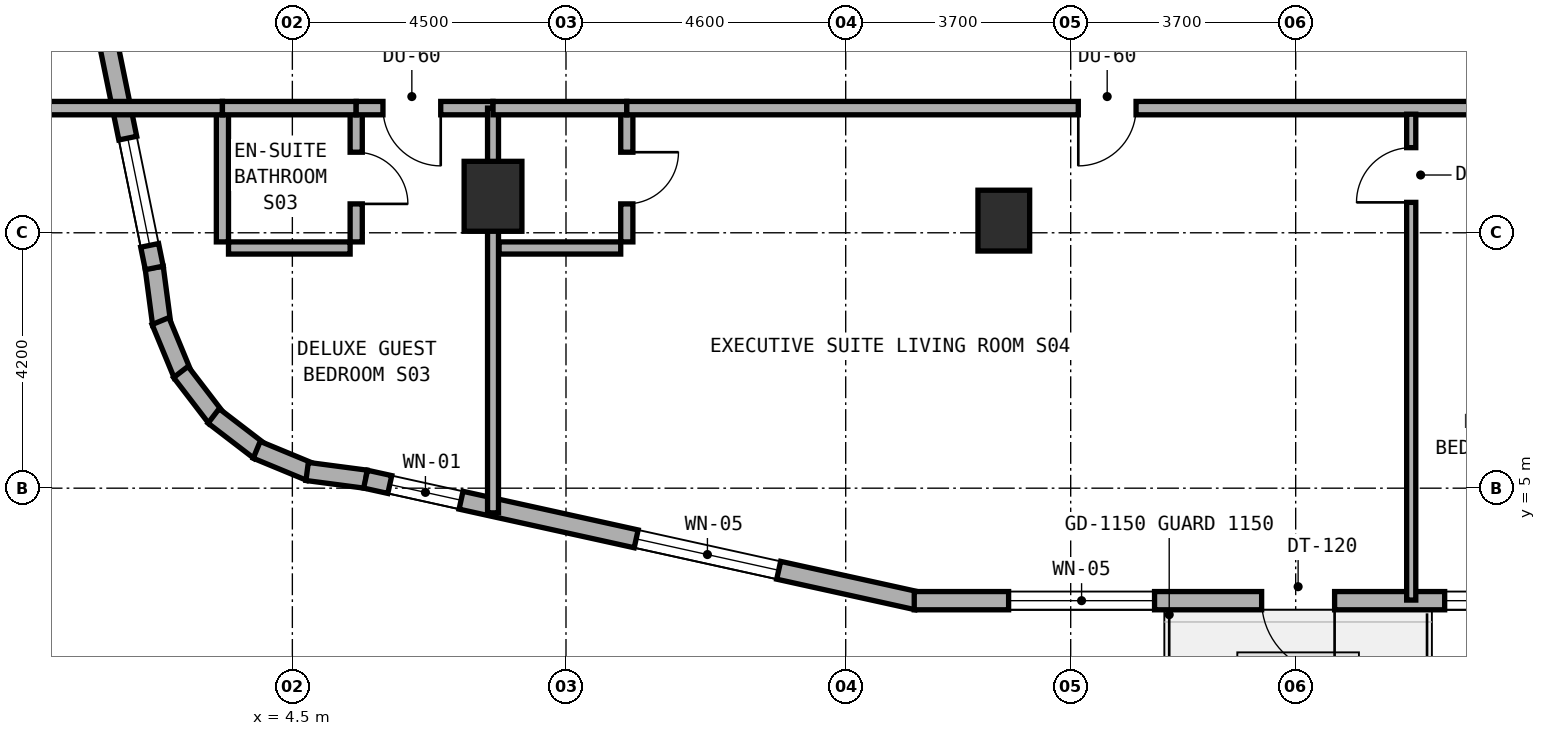
"""IFC4 building model, lengths in metres.
Left out: names, types, materials, properties, quantities, classifications, styles, units other than length and angle.
Written with IfcOpenShell. Run it as: python <this file> out.ifc"""

import sys

from ifc_helpers import new_model, si_unit, direction, frame, frame_2d, origin, origin_2d, place, context, subcontext, project, spatial, rectangle, extrude, element, fill, save


model = new_model("IFC4")
c1 = context("Model", 3, precision=1e-05, world=origin(), true_north=direction((0.0, 1.0)))
c2 = subcontext(c1, "Body", "Model", "MODEL_VIEW")
j1 = project(units=[si_unit("LENGTHUNIT", "METRE"), si_unit("PLANEANGLEUNIT", "RADIAN")], contexts=[c1])
p1 = place(None, origin())
s1 = spatial("IfcSite", under=j1, at=p1, CompositionType="ELEMENT")
p2 = place(p1, origin())
s2 = spatial("IfcBuilding", under=s1, at=p2, CompositionType="ELEMENT")
p3 = place(p2, frame((0.0, 0.0, 80.0)))
s3 = spatial("IfcBuildingStorey", under=s2, at=p3, CompositionType="ELEMENT", Elevation=80.0)
p4 = place(p3, frame((16.2, 9.4, 0.0), z_axis=(0.0, 0.0, 1.0), x_axis=(1.0, 0.0, 0.0)))
e1 = element("IfcColumn", 1, at=p4, inside=s3, PredefinedType="COLUMN", context=c2, shape_type="SweptSolid", body=[
    extrude(rectangle(XDim=0.85, YDim=1.0, at=origin_2d()), origin(), (0.0, 0.0, 1.0), 3.5),
])
p5 = place(p3, frame((7.8, 9.8, 0.0), z_axis=(0.0, 0.0, 1.0), x_axis=(1.0, 0.0, 0.0)))
e2 = element("IfcColumn", 2, at=p5, inside=s3, PredefinedType="COLUMN", context=c2, shape_type="SweptSolid", body=[
    extrude(rectangle(XDim=0.95, YDim=1.15, at=origin_2d()), origin(), (0.0, 0.0, 1.0), 3.5),
])
p6 = place(p3, frame((2.228, 8.628, 0.0), z_axis=(0.0, 0.0, 1.0), x_axis=(0.131174864804, -0.991359246108, 0.0)))
e3 = element("IfcWall", 3, at=p6, inside=s3, PredefinedType="STANDARD", context=c2, shape_type="SweptSolid", body=[
    extrude(rectangle(XDim=0.938, YDim=0.3, at=frame_2d((0.469, 0.0))), origin(), (0.0, 0.0, 1.0), 3.22),
])
p7 = place(p3, frame((2.332, 7.748, 0.0), z_axis=(0.0, 0.0, 1.0), x_axis=(0.382344263057, -0.924019948111, 0.0)))
e4 = element("IfcWall", 4, at=p7, inside=s3, PredefinedType="STANDARD", context=c2, shape_type="SweptSolid", body=[
    extrude(rectangle(XDim=0.955, YDim=0.3, at=frame_2d((0.477, 0.0))), origin(), (0.0, 0.0, 1.0), 3.22),
])
for number, where, z_axis, x_axis in (
    (5, (2.666, 6.911, 0.0), (0.0, 0.0, 1.0), (0.608, -0.794, 0.0)),
    (6, (3.205, 6.188, 0.0), (0.0, 0.0, 1.0), (0.794, -0.608, 0.0)),
):
    element("IfcWall", number, at=place(p3, frame(where, z_axis=z_axis, x_axis=x_axis)), inside=s3, PredefinedType="STANDARD", context=c2, shape_type="SweptSolid", body=[
        extrude(rectangle(XDim=0.955, YDim=0.3, at=frame_2d((0.478, 0.0))), origin(), (0.0, 0.0, 1.0), 3.22),
    ])
p8 = place(p3, frame((3.914, 5.631, 0.0), z_axis=(0.0, 0.0, 1.0), x_axis=(0.923982547689, -0.382434636986, 0.0)))
e7 = element("IfcWall", 7, at=p8, inside=s3, PredefinedType="STANDARD", context=c2, shape_type="SweptSolid", body=[
    extrude(rectangle(XDim=0.954, YDim=0.3, at=frame_2d((0.477, 0.0))), origin(), (0.0, 0.0, 1.0), 3.22),
])
p9 = place(p3, frame((4.743, 5.275, 0.0), z_axis=(0.0, 0.0, 1.0), x_axis=(0.99145856342, -0.130422072598, 0.0)))
e8 = element("IfcWall", 8, at=p9, inside=s3, PredefinedType="STANDARD", context=c2, shape_type="SweptSolid", body=[
    extrude(rectangle(XDim=0.973, YDim=0.3, at=frame_2d((0.487, 0.0))), origin(), (0.0, 0.0, 1.0), 3.22),
])
p10 = place(p3, frame((5.704, 5.148, 0.0), z_axis=(0.0, 0.0, 1.0), x_axis=(0.976539545934, -0.215338141596, 0.0)))
e9 = element("IfcWall", 9, at=p10, inside=s3, PredefinedType="STANDARD", context=c2, shape_type="SweptSolid", body=[
    extrude(rectangle(XDim=9.288, YDim=0.3, at=frame_2d((4.644, 0.0))), origin(), (0.0, 0.0, 1.0), 3.22),
])
p11 = place(p10, frame((0.408, 0.0, 0.85)))
e10 = element("IfcOpeningElement", 10, at=p11, cuts=e9, PredefinedType="OPENING", context=c2, shape_type="SweptSolid", body=[
    extrude(rectangle(XDim=1.2, YDim=1.5, at=frame_2d((0.6, 0.75))), frame((0.0, 0.16, 0.0), z_axis=(0.0, -1.0, 0.0), x_axis=(1.0, 0.0, 0.0)), (0.0, 0.0, 1.0), 0.32),
])
p12 = place(p10, frame((4.557, 0.0, 0.8)))
e11 = element("IfcOpeningElement", 11, at=p12, cuts=e9, PredefinedType="OPENING", context=c2, shape_type="SweptSolid", body=[
    extrude(rectangle(XDim=2.4, YDim=1.6, at=frame_2d((1.2, 0.8))), frame((0.0, 0.16, 0.0), z_axis=(0.0, -1.0, 0.0), x_axis=(1.0, 0.0, 0.0)), (0.0, 0.0, 1.0), 0.32),
])
p13 = place(p3, frame((14.727, 3.15, 0.0), z_axis=(0.0, 0.0, 1.0), x_axis=(1.0, 0.0, 0.0)))
e12 = element("IfcWall", 12, at=p13, inside=s3, PredefinedType="STANDARD", context=c2, shape_type="SweptSolid", body=[
    extrude(rectangle(XDim=12.591, YDim=0.3, at=frame_2d((6.295, 0.0))), origin(), (0.0, 0.0, 1.0), 3.22),
])
p14 = place(p13, frame((5.713, 0.0, 0.0)))
e13 = element("IfcOpeningElement", 13, at=p14, cuts=e12, PredefinedType="OPENING", context=c2, shape_type="SweptSolid", body=[
    extrude(rectangle(XDim=1.2, YDim=2.15, at=frame_2d((0.6, 1.075))), frame((0.0, 0.16, 0.0), z_axis=(0.0, -1.0, 0.0), x_axis=(1.0, 0.0, 0.0)), (0.0, 0.0, 1.0), 0.32),
])
p15 = place(p13, frame((1.552, 0.0, 0.8)))
e14 = element("IfcOpeningElement", 14, at=p15, cuts=e12, PredefinedType="OPENING", context=c2, shape_type="SweptSolid", body=[
    extrude(rectangle(XDim=2.4, YDim=1.6, at=frame_2d((1.2, 0.8))), frame((0.0, 0.16, 0.0), z_axis=(0.0, -1.0, 0.0), x_axis=(1.0, 0.0, 0.0)), (0.0, 0.0, 1.0), 0.32),
])
p16 = place(p13, frame((8.723, 0.0, 0.85)))
e15 = element("IfcOpeningElement", 15, at=p16, cuts=e12, PredefinedType="OPENING", context=c2, shape_type="SweptSolid", body=[
    extrude(rectangle(XDim=1.8, YDim=1.5, at=frame_2d((0.9, 0.75))), frame((0.0, 0.16, 0.0), z_axis=(0.0, -1.0, 0.0), x_axis=(1.0, 0.0, 0.0)), (0.0, 0.0, 1.0), 0.32),
])
p17 = place(p3, frame((0.216, 18.484, 0.0), z_axis=(0.0, 0.0, 1.0), x_axis=(0.199990901713, -0.979797754249, 0.0)))
e16 = element("IfcWall", 16, at=p17, inside=s3, PredefinedType="STANDARD", context=c2, shape_type="SweptSolid", body=[
    extrude(rectangle(XDim=10.065, YDim=0.3, at=frame_2d((5.033, 0.0))), origin(), (0.0, 0.0, 1.0), 3.22),
])
p18 = place(p17, frame((2.429, 0.0, 0.8)))
e17 = element("IfcOpeningElement", 17, at=p18, cuts=e16, PredefinedType="OPENING", context=c2, shape_type="SweptSolid", body=[
    extrude(rectangle(XDim=2.4, YDim=1.6, at=frame_2d((1.2, 0.8))), frame((0.0, 0.16, 0.0), z_axis=(0.0, -1.0, 0.0), x_axis=(1.0, 0.0, 0.0)), (0.0, 0.0, 1.0), 0.32),
])
p19 = place(p17, frame((7.887, 0.0, 0.85)))
e18 = element("IfcOpeningElement", 18, at=p19, cuts=e16, PredefinedType="OPENING", context=c2, shape_type="SweptSolid", body=[
    extrude(rectangle(XDim=1.8, YDim=1.5, at=frame_2d((0.9, 0.75))), frame((0.0, 0.16, 0.0), z_axis=(0.0, -1.0, 0.0), x_axis=(1.0, 0.0, 0.0)), (0.0, 0.0, 1.0), 0.32),
])
p20 = place(p3, frame((5.55, 9.05, 0.0), z_axis=(0.0, 0.0, 1.0), x_axis=(0.0, 1.0, 0.0)))
e19 = element("IfcWall", 19, at=p20, inside=s3, PredefinedType="PLUMBINGWALL", context=c2, shape_type="SweptSolid", body=[
    extrude(rectangle(XDim=2.1, YDim=0.2, at=frame_2d((1.05, 0.0))), origin(), (0.0, 0.0, 1.0), 3.22),
])
p21 = place(p20, frame((0.625, 0.0, 0.0)))
e20 = element("IfcOpeningElement", 20, at=p21, cuts=e19, PredefinedType="OPENING", context=c2, shape_type="SweptSolid", body=[
    extrude(rectangle(XDim=0.85, YDim=2.1, at=frame_2d((0.425, 1.05))), frame((0.0, 0.11, 0.0), z_axis=(0.0, -1.0, 0.0), x_axis=(1.0, 0.0, 0.0)), (0.0, 0.0, 1.0), 0.22),
])
p22 = place(p3, frame((3.45, 8.95, 0.0), z_axis=(0.0, 0.0, 1.0), x_axis=(1.0, 0.0, 0.0)))
e21 = element("IfcWall", 21, at=p22, inside=s3, PredefinedType="PLUMBINGWALL", context=c2, shape_type="SweptSolid", body=[
    extrude(rectangle(XDim=2.0, YDim=0.2, at=frame_2d((1.0, 0.0))), origin(), (0.0, 0.0, 1.0), 3.22),
])
p23 = place(p3, frame((3.35, 9.05, 0.0), z_axis=(0.0, 0.0, 1.0), x_axis=(0.0, 1.0, 0.0)))
e22 = element("IfcWall", 22, at=p23, inside=s3, PredefinedType="PLUMBINGWALL", context=c2, shape_type="SweptSolid", body=[
    extrude(rectangle(XDim=2.1, YDim=0.2, at=frame_2d((1.05, 0.0))), origin(), (0.0, 0.0, 1.0), 3.22),
])
p24 = place(p3, frame((0.24, 11.25, 0.0), z_axis=(0.0, 0.0, 1.0), x_axis=(1.0, 0.0, 0.0)))
e23 = element("IfcWall", 23, at=p24, inside=s3, PredefinedType="SOLIDWALL", context=c2, shape_type="SweptSolid", body=[
    extrude(rectangle(XDim=3.11, YDim=0.22, at=frame_2d((1.555, 0.0))), origin(), (0.0, 0.0, 1.0), 3.22),
])
p25 = place(p3, frame((3.35, 11.25, 0.0), z_axis=(0.0, 0.0, 1.0), x_axis=(1.0, 0.0, 0.0)))
e24 = element("IfcWall", 24, at=p25, inside=s3, PredefinedType="SOLIDWALL", context=c2, shape_type="SweptSolid", body=[
    extrude(rectangle(XDim=2.2, YDim=0.22, at=frame_2d((1.1, 0.0))), origin(), (0.0, 0.0, 1.0), 3.22),
])
p26 = place(p3, frame((5.55, 11.25, 0.0), z_axis=(0.0, 0.0, 1.0), x_axis=(1.0, 0.0, 0.0)))
e25 = element("IfcWall", 25, at=p26, inside=s3, PredefinedType="SOLIDWALL", context=c2, shape_type="SweptSolid", body=[
    extrude(rectangle(XDim=2.25, YDim=0.22, at=frame_2d((1.125, 0.0))), origin(), (0.0, 0.0, 1.0), 2.495),
])
p27 = place(p26, frame((0.44, 0.0, 0.0)))
e26 = element("IfcOpeningElement", 26, at=p27, cuts=e25, PredefinedType="OPENING", context=c2, shape_type="SweptSolid", body=[
    extrude(rectangle(XDim=0.95, YDim=2.1, at=frame_2d((0.475, 1.05))), frame((0.0, 0.12, 0.0), z_axis=(0.0, -1.0, 0.0), x_axis=(1.0, 0.0, 0.0)), (0.0, 0.0, 1.0), 0.24),
])
p28 = place(p3, frame((7.8, 4.594, 0.0), z_axis=(0.0, 0.0, 1.0), x_axis=(0.0, 1.0, 0.0)))
e27 = element("IfcWall", 27, at=p28, inside=s3, PredefinedType="SOLIDWALL", context=c2, shape_type="SweptSolid", body=[
    extrude(rectangle(XDim=6.656, YDim=0.18, at=frame_2d((3.328, 0.0))), origin(), (0.0, 0.0, 1.0), 2.495),
])
p29 = place(p3, frame((10.0, 9.05, 0.0), z_axis=(0.0, 0.0, 1.0), x_axis=(0.0, 1.0, 0.0)))
e28 = element("IfcWall", 28, at=p29, inside=s3, PredefinedType="PLUMBINGWALL", context=c2, shape_type="SweptSolid", body=[
    extrude(rectangle(XDim=2.1, YDim=0.2, at=frame_2d((1.05, 0.0))), origin(), (0.0, 0.0, 1.0), 2.745),
])
p30 = place(p29, frame((0.625, 0.0, 0.0)))
e29 = element("IfcOpeningElement", 29, at=p30, cuts=e28, PredefinedType="OPENING", context=c2, shape_type="SweptSolid", body=[
    extrude(rectangle(XDim=0.85, YDim=2.1, at=frame_2d((0.425, 1.05))), frame((0.0, 0.11, 0.0), z_axis=(0.0, -1.0, 0.0), x_axis=(1.0, 0.0, 0.0)), (0.0, 0.0, 1.0), 0.22),
])
p31 = place(p3, frame((7.9, 8.95, 0.0), z_axis=(0.0, 0.0, 1.0), x_axis=(1.0, 0.0, 0.0)))
e30 = element("IfcWall", 30, at=p31, inside=s3, PredefinedType="PLUMBINGWALL", context=c2, shape_type="SweptSolid", body=[
    extrude(rectangle(XDim=2.0, YDim=0.2, at=frame_2d((1.0, 0.0))), origin(), (0.0, 0.0, 1.0), 3.22),
])
p32 = place(p3, frame((7.8, 11.25, 0.0), z_axis=(0.0, 0.0, 1.0), x_axis=(1.0, 0.0, 0.0)))
e31 = element("IfcWall", 31, at=p32, inside=s3, PredefinedType="SOLIDWALL", context=c2, shape_type="SweptSolid", body=[
    extrude(rectangle(XDim=2.2, YDim=0.22, at=frame_2d((1.1, 0.0))), origin(), (0.0, 0.0, 1.0), 2.495),
])
p33 = place(p3, frame((10.0, 11.25, 0.0), z_axis=(0.0, 0.0, 1.0), x_axis=(1.0, 0.0, 0.0)))
e32 = element("IfcWall", 32, at=p33, inside=s3, PredefinedType="SOLIDWALL", context=c2, shape_type="SweptSolid", body=[
    extrude(rectangle(XDim=15.8, YDim=0.22, at=frame_2d((7.9, 0.0))), origin(), (0.0, 0.0, 1.0), 2.495),
])
p34 = place(p33, frame((7.425, 0.0, 0.0)))
e33 = element("IfcOpeningElement", 33, at=p34, cuts=e32, PredefinedType="OPENING", context=c2, shape_type="SweptSolid", body=[
    extrude(rectangle(XDim=0.95, YDim=2.1, at=frame_2d((0.475, 1.05))), frame((0.0, 0.12, 0.0), z_axis=(0.0, -1.0, 0.0), x_axis=(1.0, 0.0, 0.0)), (0.0, 0.0, 1.0), 0.24),
])
p35 = place(p3, frame((22.9, 3.16, 0.0), z_axis=(0.0, 0.0, 1.0), x_axis=(0.0, 1.0, 0.0)))
e34 = element("IfcWall", 34, at=p35, inside=s3, PredefinedType="PARTITIONING", context=c2, shape_type="SweptSolid", body=[
    extrude(rectangle(XDim=7.99, YDim=0.15, at=frame_2d((3.995, 0.0))), origin(), (0.0, 0.0, 1.0), 2.745),
])
p36 = place(p35, frame((6.54, 0.0, 0.0)))
e35 = element("IfcOpeningElement", 35, at=p36, cuts=e34, PredefinedType="OPENING", context=c2, shape_type="SweptSolid", body=[
    extrude(rectangle(XDim=0.9, YDim=2.1, at=frame_2d((0.45, 1.05))), frame((0.0, 0.085, 0.0), z_axis=(0.0, -1.0, 0.0), x_axis=(1.0, 0.0, 0.0)), (0.0, 0.0, 1.0), 0.17),
])
p37 = place(p11, origin())
e36 = element("IfcWindow", 36, at=p37, inside=s3, PartitioningType="SINGLE_PANEL", PredefinedType="WINDOW", context=c2, shape_type="SweptSolid", body=[
    extrude(rectangle(XDim=1.2, YDim=1.5, at=frame_2d((0.6, 0.75))), frame((0.0, 0.03, 0.0), z_axis=(0.0, -1.0, 0.0), x_axis=(1.0, 0.0, 0.0)), (0.0, 0.0, 1.0), 0.06),
])
fill(e10, e36)
p38 = place(p12, origin())
e37 = element("IfcWindow", 37, at=p38, inside=s3, PartitioningType="SINGLE_PANEL", PredefinedType="WINDOW", context=c2, shape_type="SweptSolid", body=[
    extrude(rectangle(XDim=2.4, YDim=1.6, at=frame_2d((1.2, 0.8))), frame((0.0, 0.03, 0.0), z_axis=(0.0, -1.0, 0.0), x_axis=(1.0, 0.0, 0.0)), (0.0, 0.0, 1.0), 0.06),
])
fill(e11, e37)
p39 = place(p14, frame((1.2, 0.0, 0.0), z_axis=(0.0, 0.0, 1.0), x_axis=(-1.0, 0.0, 0.0)))
e38 = element("IfcDoor", 38, at=p39, inside=s3, OperationType="SINGLE_SWING_LEFT", PredefinedType="DOOR", context=c2, shape_type="SweptSolid", body=[
    extrude(rectangle(XDim=1.2, YDim=2.15, at=frame_2d((0.6, 1.075))), frame((0.0, 0.025, 0.0), z_axis=(0.0, -1.0, 0.0), x_axis=(1.0, 0.0, 0.0)), (0.0, 0.0, 1.0), 0.05),
])
fill(e13, e38)
p40 = place(p15, origin())
e39 = element("IfcWindow", 39, at=p40, inside=s3, PartitioningType="SINGLE_PANEL", PredefinedType="WINDOW", context=c2, shape_type="SweptSolid", body=[
    extrude(rectangle(XDim=2.4, YDim=1.6, at=frame_2d((1.2, 0.8))), frame((0.0, 0.03, 0.0), z_axis=(0.0, -1.0, 0.0), x_axis=(1.0, 0.0, 0.0)), (0.0, 0.0, 1.0), 0.06),
])
fill(e14, e39)
p41 = place(p16, origin())
e40 = element("IfcWindow", 40, at=p41, inside=s3, PartitioningType="SINGLE_PANEL", PredefinedType="WINDOW", context=c2, shape_type="SweptSolid", body=[
    extrude(rectangle(XDim=1.8, YDim=1.5, at=frame_2d((0.9, 0.75))), frame((0.0, 0.03, 0.0), z_axis=(0.0, -1.0, 0.0), x_axis=(1.0, 0.0, 0.0)), (0.0, 0.0, 1.0), 0.06),
])
fill(e15, e40)
p42 = place(p19, origin())
e41 = element("IfcWindow", 41, at=p42, inside=s3, PartitioningType="SINGLE_PANEL", PredefinedType="WINDOW", context=c2, shape_type="SweptSolid", body=[
    extrude(rectangle(XDim=1.8, YDim=1.5, at=frame_2d((0.9, 0.75))), frame((0.0, 0.03, 0.0), z_axis=(0.0, -1.0, 0.0), x_axis=(1.0, 0.0, 0.0)), (0.0, 0.0, 1.0), 0.06),
])
fill(e18, e41)
p43 = place(p21, frame((0.85, 0.0, 0.0), z_axis=(0.0, 0.0, 1.0), x_axis=(-1.0, 0.0, 0.0)))
e42 = element("IfcDoor", 42, at=p43, inside=s3, OperationType="SINGLE_SWING_RIGHT", PredefinedType="DOOR", context=c2, shape_type="SweptSolid", body=[
    extrude(rectangle(XDim=0.85, YDim=2.1, at=frame_2d((0.425, 1.05))), frame((0.0, 0.025, 0.0), z_axis=(0.0, -1.0, 0.0), x_axis=(1.0, 0.0, 0.0)), (0.0, 0.0, 1.0), 0.05),
])
fill(e20, e42)
p44 = place(p27, frame((0.95, 0.0, 0.0), z_axis=(0.0, 0.0, 1.0), x_axis=(-1.0, 0.0, 0.0)))
e43 = element("IfcDoor", 43, at=p44, inside=s3, OperationType="SINGLE_SWING_LEFT", PredefinedType="DOOR", context=c2, shape_type="SweptSolid", body=[
    extrude(rectangle(XDim=0.95, YDim=2.1, at=frame_2d((0.475, 1.05))), frame((0.0, 0.025, 0.0), z_axis=(0.0, -1.0, 0.0), x_axis=(1.0, 0.0, 0.0)), (0.0, 0.0, 1.0), 0.05),
])
fill(e26, e43)
p45 = place(p30, frame((0.85, 0.0, 0.0), z_axis=(0.0, 0.0, 1.0), x_axis=(-1.0, 0.0, 0.0)))
e44 = element("IfcDoor", 44, at=p45, inside=s3, OperationType="SINGLE_SWING_LEFT", PredefinedType="DOOR", context=c2, shape_type="SweptSolid", body=[
    extrude(rectangle(XDim=0.85, YDim=2.1, at=frame_2d((0.425, 1.05))), frame((0.0, 0.025, 0.0), z_axis=(0.0, -1.0, 0.0), x_axis=(1.0, 0.0, 0.0)), (0.0, 0.0, 1.0), 0.05),
])
fill(e29, e44)
p46 = place(p34, frame((0.95, 0.0, 0.0), z_axis=(0.0, 0.0, 1.0), x_axis=(-1.0, 0.0, 0.0)))
e45 = element("IfcDoor", 45, at=p46, inside=s3, OperationType="SINGLE_SWING_RIGHT", PredefinedType="DOOR", context=c2, shape_type="SweptSolid", body=[
    extrude(rectangle(XDim=0.95, YDim=2.1, at=frame_2d((0.475, 1.05))), frame((0.0, 0.025, 0.0), z_axis=(0.0, -1.0, 0.0), x_axis=(1.0, 0.0, 0.0)), (0.0, 0.0, 1.0), 0.05),
])
fill(e33, e45)
p47 = place(p36, origin())
e46 = element("IfcDoor", 46, at=p47, inside=s3, OperationType="SINGLE_SWING_LEFT", PredefinedType="DOOR", context=c2, shape_type="SweptSolid", body=[
    extrude(rectangle(XDim=0.9, YDim=2.1, at=frame_2d((0.45, 1.05))), frame((0.0, 0.025, 0.0), z_axis=(0.0, -1.0, 0.0), x_axis=(1.0, 0.0, 0.0)), (0.0, 0.0, 1.0), 0.05),
])
fill(e35, e46)
save(model, sys.argv[1])
